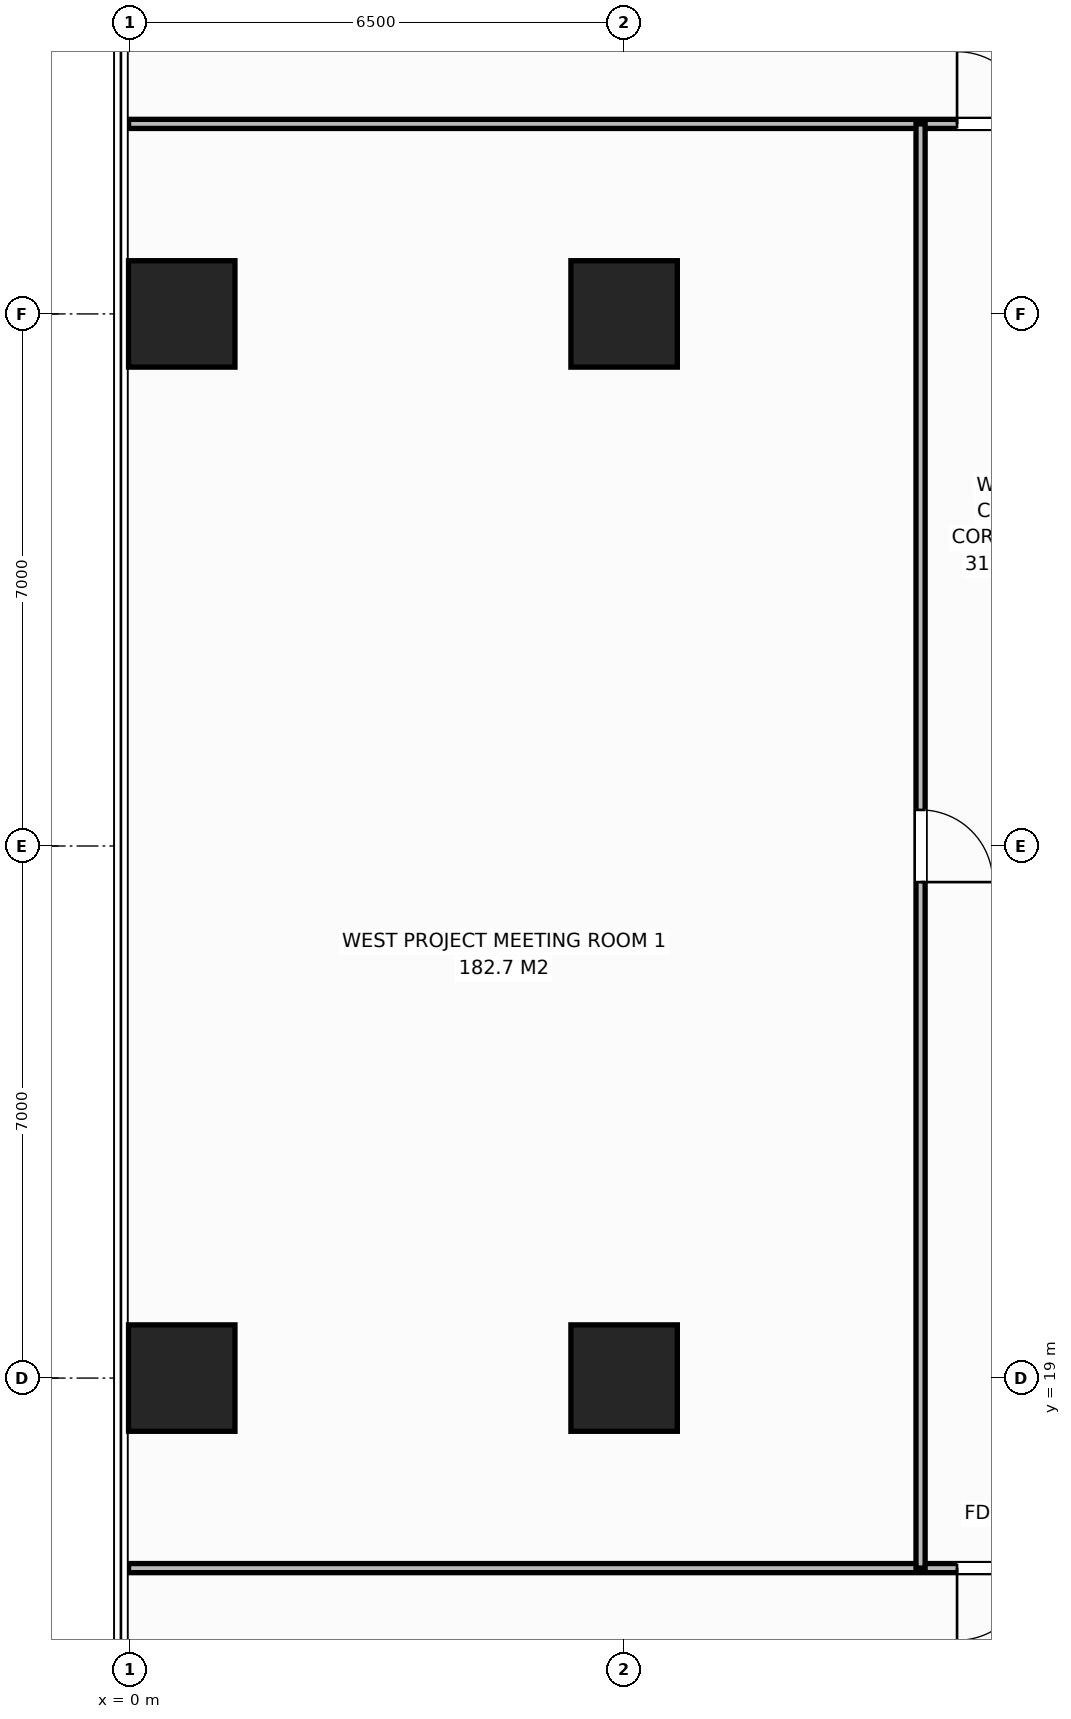
"""IFC4 building model, lengths in metres.
Left out: names, types, materials, properties, quantities, classifications, styles, units other than length and angle.
Written with IfcOpenShell. Run it as: python <this file> out.ifc"""

import sys

from ifc_helpers import new_model, si_unit, direction, frame, frame_2d, origin, origin_2d, place, context, subcontext, project, spatial, rectangle, extrude, element, fill, save


model = new_model("IFC4")
c1 = context("Model", 3, precision=1e-05, world=origin(), true_north=direction((0.0, 1.0)))
c2 = subcontext(c1, "Body", "Model", "MODEL_VIEW")
j1 = project(units=[si_unit("LENGTHUNIT", "METRE"), si_unit("PLANEANGLEUNIT", "RADIAN")], contexts=[c1])
p1 = place(None, origin())
s1 = spatial("IfcSite", under=j1, at=p1, CompositionType="ELEMENT")
p2 = place(p1, origin())
s2 = spatial("IfcBuilding", under=s1, at=p2, CompositionType="ELEMENT")
p3 = place(p2, frame((0.0, 0.0, 31.6)))
s3 = spatial("IfcBuildingStorey", under=s2, at=p3, CompositionType="ELEMENT", Elevation=31.6)
for number, where, z_axis, x_axis in (
    (1, (6.5, 19.0, 0.0), (0.0, 0.0, 1.0), (1.0, 0.0, 0.0)),
    (2, (6.5, 33.0, 0.0), (0.0, 0.0, 1.0), (1.0, 0.0, 0.0)),
    (3, (0.68, 19.0, 0.0), (0.0, 0.0, 1.0), (1.0, 0.0, 0.0)),
    (4, (0.68, 33.0, 0.0), (0.0, 0.0, 1.0), (1.0, 0.0, 0.0)),
):
    element("IfcColumn", number, at=place(p3, frame(where, z_axis=z_axis, x_axis=x_axis)), inside=s3, PredefinedType="COLUMN", context=c2, shape_type="SweptSolid", body=[
        extrude(rectangle(XDim=1.4, YDim=1.4, at=origin_2d()), origin(), (0.0, 0.0, 1.0), 3.8),
    ])
p4 = place(p3, frame((-0.02, 35.5, 0.0), z_axis=(0.0, 0.0, 1.0), x_axis=(1.0, 0.0, 0.0)))
e5 = element("IfcWall", 5, at=p4, inside=s3, PredefinedType="PARTITIONING", context=c2, shape_type="SweptSolid", body=[
    extrude(rectangle(XDim=13.16, YDim=0.12, at=frame_2d((6.58, 0.0))), origin(), (0.0, 0.0, 1.0), 3.55),
])
p5 = place(p4, frame((10.9, 0.0, 0.0)))
e6 = element("IfcOpeningElement", 6, at=p5, cuts=e5, PredefinedType="OPENING", context=c2, shape_type="SweptSolid", body=[
    extrude(rectangle(XDim=0.95, YDim=2.15, at=frame_2d((0.475, 1.075))), frame((0.0, 0.07, 0.0), z_axis=(0.0, -1.0, 0.0), x_axis=(1.0, 0.0, 0.0)), (0.0, 0.0, 1.0), 0.14),
])
p6 = place(p3, frame((-0.02, 16.5, 0.0), z_axis=(0.0, 0.0, 1.0), x_axis=(1.0, 0.0, 0.0)))
e7 = element("IfcWall", 7, at=p6, inside=s3, PredefinedType="PARTITIONING", context=c2, shape_type="SweptSolid", body=[
    extrude(rectangle(XDim=39.943, YDim=0.12, at=frame_2d((19.972, 0.0))), origin(), (0.0, 0.0, 1.0), 3.55),
])
p7 = place(p6, frame((10.9, 0.0, 0.0)))
e8 = element("IfcOpeningElement", 8, at=p7, cuts=e7, PredefinedType="OPENING", context=c2, shape_type="SweptSolid", body=[
    extrude(rectangle(XDim=0.95, YDim=2.15, at=frame_2d((0.475, 1.075))), frame((0.0, 0.07, 0.0), z_axis=(0.0, -1.0, 0.0), x_axis=(1.0, 0.0, 0.0)), (0.0, 0.0, 1.0), 0.14),
])
p8 = place(p3, frame((10.4, 16.5, 0.0), z_axis=(0.0, 0.0, 1.0), x_axis=(0.0, 1.0, 0.0)))
e9 = element("IfcWall", 9, at=p8, inside=s3, PredefinedType="PARTITIONING", context=c2, shape_type="SweptSolid", body=[
    extrude(rectangle(XDim=19.0, YDim=0.12, at=frame_2d((9.5, 0.0))), origin(), (0.0, 0.0, 1.0), 3.55),
])
p9 = place(p8, frame((9.025, 0.0, 0.0)))
e10 = element("IfcOpeningElement", 10, at=p9, cuts=e9, PredefinedType="OPENING", context=c2, shape_type="SweptSolid", body=[
    extrude(rectangle(XDim=0.95, YDim=2.15, at=frame_2d((0.475, 1.075))), frame((0.0, 0.07, 0.0), z_axis=(0.0, -1.0, 0.0), x_axis=(1.0, 0.0, 0.0)), (0.0, 0.0, 1.0), 0.14),
])
p10 = place(p5, origin())
e11 = element("IfcDoor", 11, at=p10, inside=s3, OperationType="SINGLE_SWING_LEFT", PredefinedType="DOOR", context=c2, shape_type="SweptSolid", body=[
    extrude(rectangle(XDim=0.95, YDim=2.15, at=frame_2d((0.475, 1.075))), frame((0.0, 0.025, 0.0), z_axis=(0.0, -1.0, 0.0), x_axis=(1.0, 0.0, 0.0)), (0.0, 0.0, 1.0), 0.05),
])
fill(e6, e11)
p11 = place(p7, origin())
e12 = element("IfcDoor", 12, at=p11, inside=s3, OperationType="SINGLE_SWING_RIGHT", PredefinedType="DOOR", context=c2, shape_type="SweptSolid", body=[
    extrude(rectangle(XDim=0.95, YDim=2.15, at=frame_2d((0.475, 1.075))), frame((0.0, 0.025, 0.0), z_axis=(0.0, -1.0, 0.0), x_axis=(1.0, 0.0, 0.0)), (0.0, 0.0, 1.0), 0.05),
])
fill(e8, e12)
p12 = place(p9, origin())
e13 = element("IfcDoor", 13, at=p12, inside=s3, OperationType="SINGLE_SWING_RIGHT", PredefinedType="DOOR", context=c2, shape_type="SweptSolid", body=[
    extrude(rectangle(XDim=0.95, YDim=2.15, at=frame_2d((0.475, 1.075))), frame((0.0, 0.025, 0.0), z_axis=(0.0, -1.0, 0.0), x_axis=(1.0, 0.0, 0.0)), (0.0, 0.0, 1.0), 0.05),
])
fill(e10, e13)
save(model, sys.argv[1])
